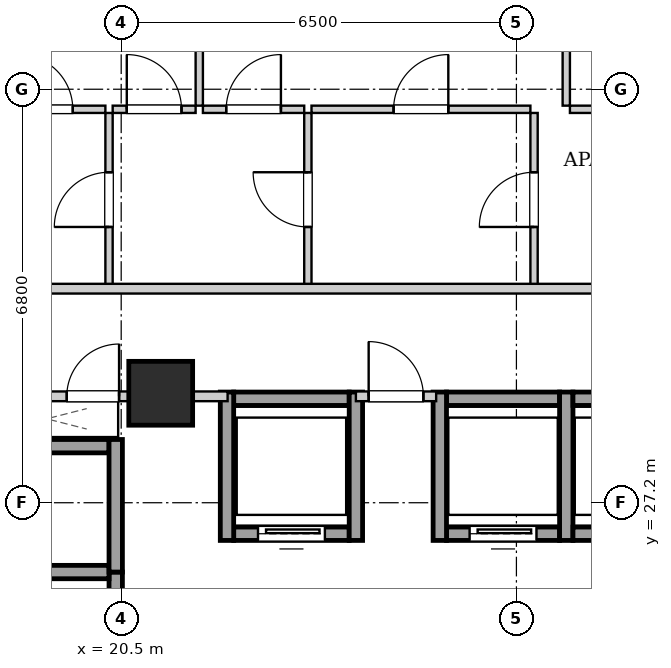
"""IFC4 building model, lengths in metres.
Left out: names, types, materials, properties, quantities, classifications, styles, units other than length and angle.
Written with IfcOpenShell. Run it as: python <this file> out.ifc"""

import sys

from ifc_helpers import new_model, si_unit, direction, frame, frame_2d, origin, origin_2d, place, context, subcontext, project, spatial, rectangle, extrude, element, fill, save


model = new_model("IFC4")
c1 = context("Model", 3, precision=1e-05, world=origin(), true_north=direction((0.0, 1.0)))
c2 = subcontext(c1, "Body", "Model", "MODEL_VIEW")
j1 = project(units=[si_unit("LENGTHUNIT", "METRE"), si_unit("PLANEANGLEUNIT", "RADIAN")], contexts=[c1])
p1 = place(None, origin())
s1 = spatial("IfcSite", under=j1, at=p1, CompositionType="ELEMENT")
p2 = place(p1, origin())
s2 = spatial("IfcBuilding", under=s1, at=p2, CompositionType="ELEMENT")
p3 = place(p2, frame((0.0, 0.0, 113.5)))
s3 = spatial("IfcBuildingStorey", under=s2, at=p3, CompositionType="ELEMENT", Elevation=113.5)
p4 = place(p3, frame((21.15, 29.0, 0.0), z_axis=(0.0, 0.0, 1.0), x_axis=(1.0, 0.0, 0.0)))
e1 = element("IfcColumn", 1, at=p4, inside=s3, PredefinedType="COLUMN", context=c2, shape_type="SweptSolid", body=[
    extrude(rectangle(XDim=1.05, YDim=1.05, at=origin_2d()), origin(), (0.0, 0.0, 1.0), 3.2),
])
p5 = place(p3, frame((22.35, 26.69, 0.0), z_axis=(0.0, 0.0, 1.0), x_axis=(1.0, 0.0, 0.0)))
e2 = element("IfcWall", 2, at=p5, inside=s3, PredefinedType="SHEAR", context=c2, shape_type="SweptSolid", body=[
    extrude(rectangle(XDim=1.9, YDim=0.22, at=frame_2d((0.95, 0.0))), origin(), (0.0, 0.0, 1.0), 2.94),
])
p6 = place(p5, frame((0.4, 0.0, 0.0)))
e3 = element("IfcOpeningElement", 3, at=p6, cuts=e2, PredefinedType="OPENING", context=c2, shape_type="SweptSolid", body=[
    extrude(rectangle(XDim=1.1, YDim=2.15, at=frame_2d((0.55, 1.075))), frame((0.0, 0.12, 0.0), z_axis=(0.0, -1.0, 0.0), x_axis=(1.0, 0.0, 0.0)), (0.0, 0.0, 1.0), 0.24),
])
p7 = place(p3, frame((22.35, 28.91, 0.0), z_axis=(0.0, 0.0, 1.0), x_axis=(1.0, 0.0, 0.0)))
e4 = element("IfcWall", 4, at=p7, inside=s3, PredefinedType="SHEAR", context=c2, shape_type="SweptSolid", body=[
    extrude(rectangle(XDim=1.9, YDim=0.22, at=frame_2d((0.95, 0.0))), origin(), (0.0, 0.0, 1.0), 2.94),
])
for number, where, z_axis, x_axis in (
    (5, (22.24, 26.58, 0.0), (0.0, 0.0, 1.0), (0.0, 1.0, 0.0)),
    (6, (24.36, 26.58, 0.0), (0.0, 0.0, 1.0), (0.0, 1.0, 0.0)),
):
    element("IfcWall", number, at=place(p3, frame(where, z_axis=z_axis, x_axis=x_axis)), inside=s3, PredefinedType="SHEAR", context=c2, shape_type="SweptSolid", body=[
        extrude(rectangle(XDim=2.44, YDim=0.22, at=frame_2d((1.22, 0.0))), origin(), (0.0, 0.0, 1.0), 2.94),
    ])
p8 = place(p3, frame((25.85, 26.69, 0.0), z_axis=(0.0, 0.0, 1.0), x_axis=(1.0, 0.0, 0.0)))
e7 = element("IfcWall", 7, at=p8, inside=s3, PredefinedType="SHEAR", context=c2, shape_type="SweptSolid", body=[
    extrude(rectangle(XDim=1.86, YDim=0.22, at=frame_2d((0.93, 0.0))), origin(), (0.0, 0.0, 1.0), 2.94),
])
p9 = place(p8, frame((0.38, 0.0, 0.0)))
e8 = element("IfcOpeningElement", 8, at=p9, cuts=e7, PredefinedType="OPENING", context=c2, shape_type="SweptSolid", body=[
    extrude(rectangle(XDim=1.1, YDim=2.15, at=frame_2d((0.55, 1.075))), frame((0.0, 0.12, 0.0), z_axis=(0.0, -1.0, 0.0), x_axis=(1.0, 0.0, 0.0)), (0.0, 0.0, 1.0), 0.24),
])
p10 = place(p3, frame((25.85, 28.91, 0.0), z_axis=(0.0, 0.0, 1.0), x_axis=(1.0, 0.0, 0.0)))
e9 = element("IfcWall", 9, at=p10, inside=s3, PredefinedType="SHEAR", context=c2, shape_type="SweptSolid", body=[
    extrude(rectangle(XDim=1.86, YDim=0.22, at=frame_2d((0.93, 0.0))), origin(), (0.0, 0.0, 1.0), 2.94),
])
for number, where, z_axis, x_axis in (
    (10, (25.74, 26.58, 0.0), (0.0, 0.0, 1.0), (0.0, 1.0, 0.0)),
    (11, (27.82, 26.58, 0.0), (0.0, 0.0, 1.0), (0.0, 1.0, 0.0)),
):
    element("IfcWall", number, at=place(p3, frame(where, z_axis=z_axis, x_axis=x_axis)), inside=s3, PredefinedType="SHEAR", context=c2, shape_type="SweptSolid", body=[
        extrude(rectangle(XDim=2.44, YDim=0.22, at=frame_2d((1.22, 0.0))), origin(), (0.0, 0.0, 1.0), 2.94),
    ])
p11 = place(p3, frame((27.93, 26.69, 0.0), z_axis=(0.0, 0.0, 1.0), x_axis=(1.0, 0.0, 0.0)))
e12 = element("IfcWall", 12, at=p11, inside=s3, PredefinedType="SHEAR", context=c2, shape_type="SweptSolid", body=[
    extrude(rectangle(XDim=1.86, YDim=0.22, at=frame_2d((0.93, 0.0))), origin(), (0.0, 0.0, 1.0), 2.94),
])
p12 = place(p11, frame((0.38, 0.0, 0.0)))
e13 = element("IfcOpeningElement", 13, at=p12, cuts=e12, PredefinedType="OPENING", context=c2, shape_type="SweptSolid", body=[
    extrude(rectangle(XDim=1.1, YDim=2.15, at=frame_2d((0.55, 1.075))), frame((0.0, 0.12, 0.0), z_axis=(0.0, -1.0, 0.0), x_axis=(1.0, 0.0, 0.0)), (0.0, 0.0, 1.0), 0.24),
])
p13 = place(p3, frame((27.93, 28.91, 0.0), z_axis=(0.0, 0.0, 1.0), x_axis=(1.0, 0.0, 0.0)))
e14 = element("IfcWall", 14, at=p13, inside=s3, PredefinedType="SHEAR", context=c2, shape_type="SweptSolid", body=[
    extrude(rectangle(XDim=1.86, YDim=0.22, at=frame_2d((0.93, 0.0))), origin(), (0.0, 0.0, 1.0), 2.94),
])
p14 = place(p3, frame((20.41, 24.1, 0.0), z_axis=(0.0, 0.0, 1.0), x_axis=(0.0, 1.0, 0.0)))
e15 = element("IfcWall", 15, at=p14, inside=s3, PredefinedType="SHEAR", context=c2, shape_type="SweptSolid", body=[
    extrude(rectangle(XDim=1.96, YDim=0.22, at=frame_2d((0.98, 0.0))), origin(), (0.0, 0.0, 1.0), 2.94),
])
for number, where, z_axis, x_axis in (
    (16, (18.4, 26.06, 0.0), (0.0, 0.0, 1.0), (1.0, 0.0, 0.0)),
    (17, (18.4, 28.13, 0.0), (0.0, 0.0, 1.0), (1.0, 0.0, 0.0)),
):
    element("IfcWall", number, at=place(p3, frame(where, z_axis=z_axis, x_axis=x_axis)), inside=s3, PredefinedType="SHEAR", context=c2, shape_type="SweptSolid", body=[
        extrude(rectangle(XDim=1.9, YDim=0.22, at=frame_2d((0.95, 0.0))), origin(), (0.0, 0.0, 1.0), 2.94),
    ])
p15 = place(p3, frame((20.41, 26.06, 0.0), z_axis=(0.0, 0.0, 1.0), x_axis=(0.0, 1.0, 0.0)))
e18 = element("IfcWall", 18, at=p15, inside=s3, PredefinedType="SHEAR", context=c2, shape_type="SweptSolid", body=[
    extrude(rectangle(XDim=2.18, YDim=0.22, at=frame_2d((1.09, 0.0))), origin(), (0.0, 0.0, 1.0), 2.94),
])
p16 = place(p3, frame((24.36, 28.95, 0.0), z_axis=(0.0, 0.0, 1.0), x_axis=(1.0, 0.0, 0.0)))
e19 = element("IfcWall", 19, at=p16, inside=s3, PredefinedType="PARTITIONING", context=c2, shape_type="SweptSolid", body=[
    extrude(rectangle(XDim=1.32, YDim=0.16, at=frame_2d((0.66, 0.0))), origin(), (0.0, 0.0, 1.0), 2.313),
])
p17 = place(p16, frame((0.21, 0.0, 0.0)))
e20 = element("IfcOpeningElement", 20, at=p17, cuts=e19, PredefinedType="OPENING", context=c2, shape_type="SweptSolid", body=[
    extrude(rectangle(XDim=0.9, YDim=2.05, at=frame_2d((0.45, 1.025))), frame((0.0, 0.09, 0.0), z_axis=(0.0, -1.0, 0.0), x_axis=(1.0, 0.0, 0.0)), (0.0, 0.0, 1.0), 0.18),
])
p18 = place(p3, frame((17.96, 28.95, 0.0), z_axis=(0.0, 0.0, 1.0), x_axis=(1.0, 0.0, 0.0)))
e21 = element("IfcWall", 21, at=p18, inside=s3, PredefinedType="PARTITIONING", context=c2, shape_type="SweptSolid", body=[
    extrude(rectangle(XDim=4.29, YDim=0.16, at=frame_2d((2.145, 0.0))), origin(), (0.0, 0.0, 1.0), 2.313),
])
p19 = place(p18, frame((1.645, 0.0, 0.0)))
e22 = element("IfcOpeningElement", 22, at=p19, cuts=e21, PredefinedType="OPENING", context=c2, shape_type="SweptSolid", body=[
    extrude(rectangle(XDim=0.86, YDim=2.05, at=frame_2d((0.43, 1.025))), frame((0.0, 0.09, 0.0), z_axis=(0.0, -1.0, 0.0), x_axis=(1.0, 0.0, 0.0)), (0.0, 0.0, 1.0), 0.18),
])
p20 = place(p3, frame((20.3, 30.76, 0.0), z_axis=(0.0, 0.0, 1.0), x_axis=(0.0, 1.0, 0.0)))
e23 = element("IfcWall", 23, at=p20, inside=s3, PredefinedType="PARTITIONING", context=c2, shape_type="SweptSolid", body=[
    extrude(rectangle(XDim=2.85, YDim=0.12, at=frame_2d((1.425, 0.0))), origin(), (0.0, 0.0, 1.0), 2.94),
])
p21 = place(p20, frame((0.975, 0.0, 0.0)))
e24 = element("IfcOpeningElement", 24, at=p21, cuts=e23, PredefinedType="OPENING", context=c2, shape_type="SweptSolid", body=[
    extrude(rectangle(XDim=0.9, YDim=2.05, at=frame_2d((0.45, 1.025))), frame((0.0, 0.07, 0.0), z_axis=(0.0, -1.0, 0.0), x_axis=(1.0, 0.0, 0.0)), (0.0, 0.0, 1.0), 0.14),
])
p22 = place(p3, frame((18.268, 33.67, 0.0), z_axis=(0.0, 0.0, 1.0), x_axis=(1.0, 0.0, 0.0)))
e25 = element("IfcWall", 25, at=p22, inside=s3, PredefinedType="PARTITIONING", context=c2, shape_type="SweptSolid", body=[
    extrude(rectangle(XDim=1.972, YDim=0.12, at=frame_2d((0.986, 0.0))), origin(), (0.0, 0.0, 1.0), 2.94),
])
p23 = place(p22, frame((0.536, 0.0, 0.0)))
e26 = element("IfcOpeningElement", 26, at=p23, cuts=e25, PredefinedType="OPENING", context=c2, shape_type="SweptSolid", body=[
    extrude(rectangle(XDim=0.9, YDim=2.05, at=frame_2d((0.45, 1.025))), frame((0.0, 0.07, 0.0), z_axis=(0.0, -1.0, 0.0), x_axis=(1.0, 0.0, 0.0)), (0.0, 0.0, 1.0), 0.14),
])
p24 = place(p3, frame((23.57, 30.76, 0.0), z_axis=(0.0, 0.0, 1.0), x_axis=(0.0, 1.0, 0.0)))
e27 = element("IfcWall", 27, at=p24, inside=s3, PredefinedType="PARTITIONING", context=c2, shape_type="SweptSolid", body=[
    extrude(rectangle(XDim=2.85, YDim=0.12, at=frame_2d((1.425, 0.0))), origin(), (0.0, 0.0, 1.0), 2.94),
])
p25 = place(p24, frame((0.975, 0.0, 0.0)))
e28 = element("IfcOpeningElement", 28, at=p25, cuts=e27, PredefinedType="OPENING", context=c2, shape_type="SweptSolid", body=[
    extrude(rectangle(XDim=0.9, YDim=2.05, at=frame_2d((0.45, 1.025))), frame((0.0, 0.07, 0.0), z_axis=(0.0, -1.0, 0.0), x_axis=(1.0, 0.0, 0.0)), (0.0, 0.0, 1.0), 0.14),
])
p26 = place(p3, frame((20.36, 33.67, 0.0), z_axis=(0.0, 0.0, 1.0), x_axis=(1.0, 0.0, 0.0)))
e29 = element("IfcWall", 29, at=p26, inside=s3, PredefinedType="PARTITIONING", context=c2, shape_type="SweptSolid", body=[
    extrude(rectangle(XDim=1.364, YDim=0.12, at=frame_2d((0.682, 0.0))), origin(), (0.0, 0.0, 1.0), 2.94),
])
p27 = place(p26, frame((0.232, 0.0, 0.0)))
e30 = element("IfcOpeningElement", 30, at=p27, cuts=e29, PredefinedType="OPENING", context=c2, shape_type="SweptSolid", body=[
    extrude(rectangle(XDim=0.9, YDim=2.05, at=frame_2d((0.45, 1.025))), frame((0.0, 0.07, 0.0), z_axis=(0.0, -1.0, 0.0), x_axis=(1.0, 0.0, 0.0)), (0.0, 0.0, 1.0), 0.14),
])
p28 = place(p3, frame((21.844, 33.67, 0.0), z_axis=(0.0, 0.0, 1.0), x_axis=(1.0, 0.0, 0.0)))
e31 = element("IfcWall", 31, at=p28, inside=s3, PredefinedType="PARTITIONING", context=c2, shape_type="SweptSolid", body=[
    extrude(rectangle(XDim=1.666, YDim=0.12, at=frame_2d((0.833, 0.0))), origin(), (0.0, 0.0, 1.0), 2.94),
])
p29 = place(p28, frame((0.383, 0.0, 0.0)))
e32 = element("IfcOpeningElement", 32, at=p29, cuts=e31, PredefinedType="OPENING", context=c2, shape_type="SweptSolid", body=[
    extrude(rectangle(XDim=0.9, YDim=2.05, at=frame_2d((0.45, 1.025))), frame((0.0, 0.07, 0.0), z_axis=(0.0, -1.0, 0.0), x_axis=(1.0, 0.0, 0.0)), (0.0, 0.0, 1.0), 0.14),
])
p30 = place(p3, frame((27.29, 30.76, 0.0), z_axis=(0.0, 0.0, 1.0), x_axis=(0.0, 1.0, 0.0)))
e33 = element("IfcWall", 33, at=p30, inside=s3, PredefinedType="PARTITIONING", context=c2, shape_type="SweptSolid", body=[
    extrude(rectangle(XDim=2.85, YDim=0.12, at=frame_2d((1.425, 0.0))), origin(), (0.0, 0.0, 1.0), 2.94),
])
p31 = place(p30, frame((0.975, 0.0, 0.0)))
e34 = element("IfcOpeningElement", 34, at=p31, cuts=e33, PredefinedType="OPENING", context=c2, shape_type="SweptSolid", body=[
    extrude(rectangle(XDim=0.9, YDim=2.05, at=frame_2d((0.45, 1.025))), frame((0.0, 0.07, 0.0), z_axis=(0.0, -1.0, 0.0), x_axis=(1.0, 0.0, 0.0)), (0.0, 0.0, 1.0), 0.14),
])
p32 = place(p3, frame((23.63, 33.67, 0.0), z_axis=(0.0, 0.0, 1.0), x_axis=(1.0, 0.0, 0.0)))
e35 = element("IfcWall", 35, at=p32, inside=s3, PredefinedType="PARTITIONING", context=c2, shape_type="SweptSolid", body=[
    extrude(rectangle(XDim=3.6, YDim=0.12, at=frame_2d((1.8, 0.0))), origin(), (0.0, 0.0, 1.0), 2.94),
])
p33 = place(p32, frame((1.35, 0.0, 0.0)))
e36 = element("IfcOpeningElement", 36, at=p33, cuts=e35, PredefinedType="OPENING", context=c2, shape_type="SweptSolid", body=[
    extrude(rectangle(XDim=0.9, YDim=2.05, at=frame_2d((0.45, 1.025))), frame((0.0, 0.07, 0.0), z_axis=(0.0, -1.0, 0.0), x_axis=(1.0, 0.0, 0.0)), (0.0, 0.0, 1.0), 0.14),
])
p34 = place(p3, frame((27.88, 33.67, 0.0), z_axis=(0.0, 0.0, 1.0), x_axis=(1.0, 0.0, 0.0)))
e37 = element("IfcWall", 37, at=p34, inside=s3, PredefinedType="PARTITIONING", context=c2, shape_type="SweptSolid", body=[
    extrude(rectangle(XDim=3.24, YDim=0.12, at=frame_2d((1.62, 0.0))), origin(), (0.0, 0.0, 1.0), 2.94),
])
p35 = place(p34, frame((1.17, 0.0, 0.0)))
e38 = element("IfcOpeningElement", 38, at=p35, cuts=e37, PredefinedType="OPENING", context=c2, shape_type="SweptSolid", body=[
    extrude(rectangle(XDim=0.9, YDim=2.05, at=frame_2d((0.45, 1.025))), frame((0.0, 0.07, 0.0), z_axis=(0.0, -1.0, 0.0), x_axis=(1.0, 0.0, 0.0)), (0.0, 0.0, 1.0), 0.14),
])
p36 = place(p3, frame((21.784, 33.73, 0.0), z_axis=(0.0, 0.0, 1.0), x_axis=(0.0, 1.0, 0.0)))
e39 = element("IfcWall", 39, at=p36, inside=s3, PredefinedType="PARTITIONING", context=c2, shape_type="SweptSolid", body=[
    extrude(rectangle(XDim=9.29, YDim=0.12, at=frame_2d((4.645, 0.0))), origin(), (0.0, 0.0, 1.0), 2.94),
])
p37 = place(p36, frame((4.18, 0.0, 0.0)))
e40 = element("IfcOpeningElement", 40, at=p37, cuts=e39, PredefinedType="OPENING", context=c2, shape_type="SweptSolid", body=[
    extrude(rectangle(XDim=0.9, YDim=2.05, at=frame_2d((0.45, 1.025))), frame((0.0, 0.07, 0.0), z_axis=(0.0, -1.0, 0.0), x_axis=(1.0, 0.0, 0.0)), (0.0, 0.0, 1.0), 0.14),
])
p38 = place(p3, frame((27.82, 33.73, 0.0), z_axis=(0.0, 0.0, 1.0), x_axis=(0.0, 1.0, 0.0)))
e41 = element("IfcWall", 41, at=p38, inside=s3, PredefinedType="PARTITIONING", context=c2, shape_type="SweptSolid", body=[
    extrude(rectangle(XDim=9.29, YDim=0.12, at=frame_2d((4.645, 0.0))), origin(), (0.0, 0.0, 1.0), 2.94),
])
p39 = place(p38, frame((4.18, 0.0, 0.0)))
e42 = element("IfcOpeningElement", 42, at=p39, cuts=e41, PredefinedType="OPENING", context=c2, shape_type="SweptSolid", body=[
    extrude(rectangle(XDim=0.9, YDim=2.05, at=frame_2d((0.45, 1.025))), frame((0.0, 0.07, 0.0), z_axis=(0.0, -1.0, 0.0), x_axis=(1.0, 0.0, 0.0)), (0.0, 0.0, 1.0), 0.14),
])
p40 = place(p3, frame((10.05, 30.72, 0.0), z_axis=(0.0, 0.0, 1.0), x_axis=(1.0, 0.0, 0.0)))
e43 = element("IfcWall", 43, at=p40, inside=s3, PredefinedType="PARTITIONING", context=c2, shape_type="SweptSolid", body=[
    extrude(rectangle(XDim=30.8, YDim=0.16, at=frame_2d((15.4, 0.0))), origin(), (0.0, 0.0, 1.0), 2.94),
])
p41 = place(p40, frame((4.035, 0.0, 0.0)))
e44 = element("IfcOpeningElement", 44, at=p41, cuts=e43, PredefinedType="OPENING", context=c2, shape_type="SweptSolid", body=[
    extrude(rectangle(XDim=0.95, YDim=2.1, at=frame_2d((0.475, 1.05))), frame((0.0, 0.09, 0.0), z_axis=(0.0, -1.0, 0.0), x_axis=(1.0, 0.0, 0.0)), (0.0, 0.0, 1.0), 0.18),
])
p42 = place(p40, frame((25.11, 0.0, 0.0)))
e45 = element("IfcOpeningElement", 45, at=p42, cuts=e43, PredefinedType="OPENING", context=c2, shape_type="SweptSolid", body=[
    extrude(rectangle(XDim=0.95, YDim=2.1, at=frame_2d((0.475, 1.05))), frame((0.0, 0.09, 0.0), z_axis=(0.0, -1.0, 0.0), x_axis=(1.0, 0.0, 0.0)), (0.0, 0.0, 1.0), 0.18),
])
p43 = place(p6, origin())
e46 = element("IfcDoor", 46, at=p43, inside=s3, OperationType="SLIDING_TO_LEFT", PredefinedType="DOOR", context=c2, shape_type="SweptSolid", body=[
    extrude(rectangle(XDim=1.1, YDim=2.15, at=frame_2d((0.55, 1.075))), frame((0.0, 0.025, 0.0), z_axis=(0.0, -1.0, 0.0), x_axis=(1.0, 0.0, 0.0)), (0.0, 0.0, 1.0), 0.05),
])
fill(e3, e46)
p44 = place(p9, origin())
e47 = element("IfcDoor", 47, at=p44, inside=s3, OperationType="SLIDING_TO_LEFT", PredefinedType="DOOR", context=c2, shape_type="SweptSolid", body=[
    extrude(rectangle(XDim=1.1, YDim=2.15, at=frame_2d((0.55, 1.075))), frame((0.0, 0.025, 0.0), z_axis=(0.0, -1.0, 0.0), x_axis=(1.0, 0.0, 0.0)), (0.0, 0.0, 1.0), 0.05),
])
fill(e8, e47)
p45 = place(p17, origin())
e48 = element("IfcDoor", 48, at=p45, inside=s3, OperationType="SINGLE_SWING_LEFT", PredefinedType="DOOR", context=c2, shape_type="SweptSolid", body=[
    extrude(rectangle(XDim=0.9, YDim=2.05, at=frame_2d((0.45, 1.025))), frame((0.0, 0.025, 0.0), z_axis=(0.0, -1.0, 0.0), x_axis=(1.0, 0.0, 0.0)), (0.0, 0.0, 1.0), 0.05),
])
fill(e20, e48)
p46 = place(p19, origin())
e49 = element("IfcDoor", 49, at=p46, inside=s3, OperationType="SINGLE_SWING_RIGHT", PredefinedType="DOOR", context=c2, shape_type="SweptSolid", body=[
    extrude(rectangle(XDim=0.86, YDim=2.05, at=frame_2d((0.43, 1.025))), frame((0.0, 0.025, 0.0), z_axis=(0.0, -1.0, 0.0), x_axis=(1.0, 0.0, 0.0)), (0.0, 0.0, 1.0), 0.05),
])
fill(e22, e49)
p47 = place(p21, origin())
e50 = element("IfcDoor", 50, at=p47, inside=s3, OperationType="SINGLE_SWING_LEFT", PredefinedType="DOOR", context=c2, shape_type="SweptSolid", body=[
    extrude(rectangle(XDim=0.9, YDim=2.05, at=frame_2d((0.45, 1.025))), frame((0.0, 0.025, 0.0), z_axis=(0.0, -1.0, 0.0), x_axis=(1.0, 0.0, 0.0)), (0.0, 0.0, 1.0), 0.05),
])
fill(e24, e50)
p48 = place(p23, origin())
e51 = element("IfcDoor", 51, at=p48, inside=s3, OperationType="SINGLE_SWING_LEFT", PredefinedType="DOOR", context=c2, shape_type="SweptSolid", body=[
    extrude(rectangle(XDim=0.9, YDim=2.05, at=frame_2d((0.45, 1.025))), frame((0.0, 0.025, 0.0), z_axis=(0.0, -1.0, 0.0), x_axis=(1.0, 0.0, 0.0)), (0.0, 0.0, 1.0), 0.05),
])
fill(e26, e51)
p49 = place(p25, origin())
e52 = element("IfcDoor", 52, at=p49, inside=s3, OperationType="SINGLE_SWING_RIGHT", PredefinedType="DOOR", context=c2, shape_type="SweptSolid", body=[
    extrude(rectangle(XDim=0.9, YDim=2.05, at=frame_2d((0.45, 1.025))), frame((0.0, 0.025, 0.0), z_axis=(0.0, -1.0, 0.0), x_axis=(1.0, 0.0, 0.0)), (0.0, 0.0, 1.0), 0.05),
])
fill(e28, e52)
p50 = place(p27, origin())
e53 = element("IfcDoor", 53, at=p50, inside=s3, OperationType="SINGLE_SWING_LEFT", PredefinedType="DOOR", context=c2, shape_type="SweptSolid", body=[
    extrude(rectangle(XDim=0.9, YDim=2.05, at=frame_2d((0.45, 1.025))), frame((0.0, 0.025, 0.0), z_axis=(0.0, -1.0, 0.0), x_axis=(1.0, 0.0, 0.0)), (0.0, 0.0, 1.0), 0.05),
])
fill(e30, e53)
p51 = place(p29, origin())
e54 = element("IfcDoor", 54, at=p51, inside=s3, OperationType="SINGLE_SWING_RIGHT", PredefinedType="DOOR", context=c2, shape_type="SweptSolid", body=[
    extrude(rectangle(XDim=0.9, YDim=2.05, at=frame_2d((0.45, 1.025))), frame((0.0, 0.025, 0.0), z_axis=(0.0, -1.0, 0.0), x_axis=(1.0, 0.0, 0.0)), (0.0, 0.0, 1.0), 0.05),
])
fill(e32, e54)
p52 = place(p31, origin())
e55 = element("IfcDoor", 55, at=p52, inside=s3, OperationType="SINGLE_SWING_LEFT", PredefinedType="DOOR", context=c2, shape_type="SweptSolid", body=[
    extrude(rectangle(XDim=0.9, YDim=2.05, at=frame_2d((0.45, 1.025))), frame((0.0, 0.025, 0.0), z_axis=(0.0, -1.0, 0.0), x_axis=(1.0, 0.0, 0.0)), (0.0, 0.0, 1.0), 0.05),
])
fill(e34, e55)
p53 = place(p33, origin())
e56 = element("IfcDoor", 56, at=p53, inside=s3, OperationType="SINGLE_SWING_RIGHT", PredefinedType="DOOR", context=c2, shape_type="SweptSolid", body=[
    extrude(rectangle(XDim=0.9, YDim=2.05, at=frame_2d((0.45, 1.025))), frame((0.0, 0.025, 0.0), z_axis=(0.0, -1.0, 0.0), x_axis=(1.0, 0.0, 0.0)), (0.0, 0.0, 1.0), 0.05),
])
fill(e36, e56)
save(model, sys.argv[1])
